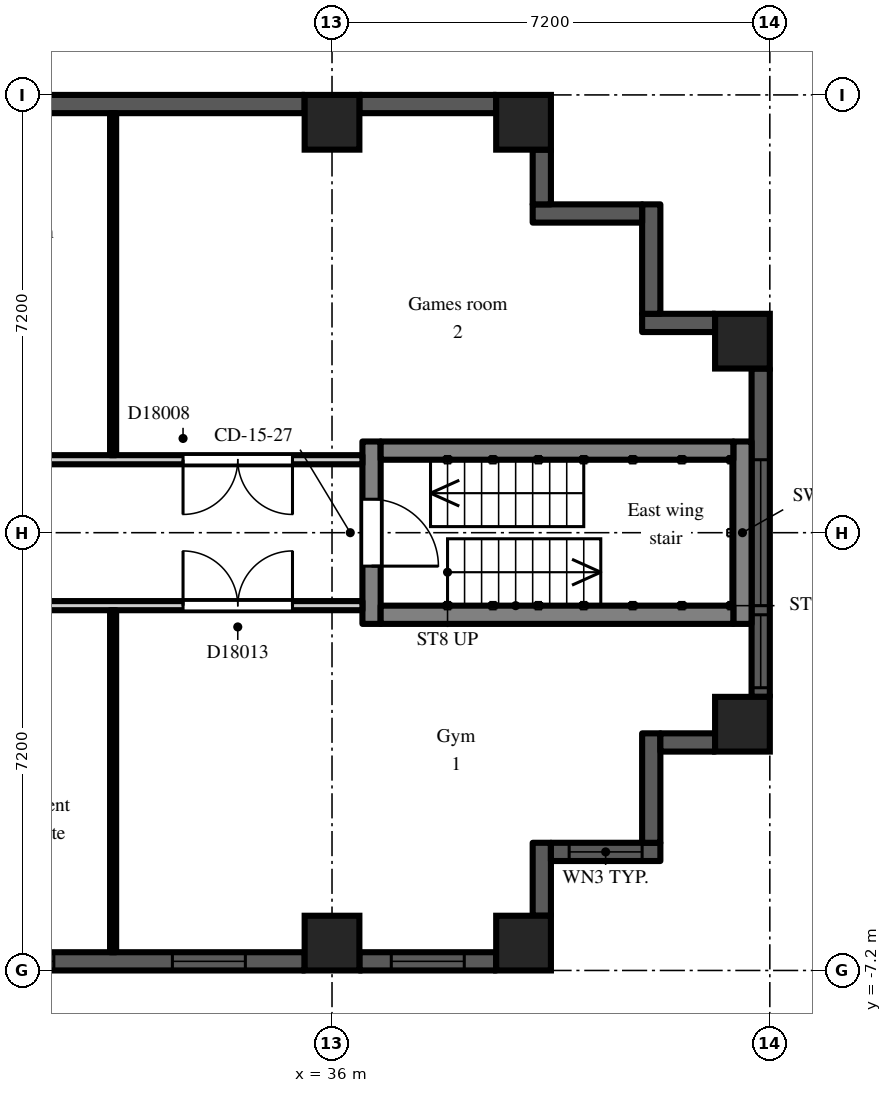
"""IFC4 building model, lengths in metres.
Left out: names, types, materials, properties, quantities, classifications, styles, units other than length and angle.
Written with IfcOpenShell. Run it as: python <this file> out.ifc"""

import sys

from ifc_helpers import new_model, si_unit, direction, frame, frame_2d, origin, origin_2d, place, context, subcontext, project, spatial, rectangle, extrude, element, fill, save


model = new_model("IFC4")
c1 = context("Model", 3, precision=1e-05, world=origin(), true_north=direction((0.0, 1.0)))
c2 = subcontext(c1, "Body", "Model", "MODEL_VIEW")
j1 = project(units=[si_unit("LENGTHUNIT", "METRE"), si_unit("PLANEANGLEUNIT", "RADIAN")], contexts=[c1])
p1 = place(None, origin())
s1 = spatial("IfcSite", under=j1, at=p1, CompositionType="ELEMENT")
p2 = place(p1, origin())
s2 = spatial("IfcBuilding", under=s1, at=p2, CompositionType="ELEMENT")
p3 = place(p2, frame((0.0, 0.0, 120.3)))
s3 = spatial("IfcBuildingStorey", under=s2, at=p3, CompositionType="ELEMENT", Elevation=120.3)
for number, where, z_axis, x_axis in (
    (1, (36.0, -6.75, 0.0), (0.0, 0.0, 1.0), (1.0, 0.0, 0.0)),
    (2, (36.0, 6.75, 0.0), (0.0, 0.0, 1.0), (1.0, 0.0, 0.0)),
    (3, (39.15, -6.75, 0.0), (0.0, 0.0, 1.0), (1.0, 0.0, 0.0)),
    (4, (39.15, 6.75, 0.0), (0.0, 0.0, 1.0), (1.0, 0.0, 0.0)),
    (5, (42.75, -3.15, 0.0), (0.0, 0.0, 1.0), (1.0, 0.0, 0.0)),
    (6, (42.75, 3.15, 0.0), (0.0, 0.0, 1.0), (1.0, 0.0, 0.0)),
):
    element("IfcColumn", number, at=place(p3, frame(where, z_axis=z_axis, x_axis=x_axis)), inside=s3, PredefinedType="COLUMN", context=c2, shape_type="SweptSolid", body=[
        extrude(rectangle(XDim=0.9, YDim=0.9, at=origin_2d()), origin(), (0.0, 0.0, 1.0), 3.0),
    ])
p4 = place(p3, frame((29.25, -7.05, 0.0), z_axis=(0.0, 0.0, 1.0), x_axis=(1.0, 0.0, 0.0)))
e7 = element("IfcWall", 7, at=p4, inside=s3, PredefinedType="SOLIDWALL", context=c2, shape_type="SweptSolid", body=[
    extrude(rectangle(XDim=6.3, YDim=0.3, at=frame_2d((3.15, 0.0))), origin(), (0.0, 0.0, 1.0), 2.2),
])
p5 = place(p4, frame((0.975, 0.0, 0.2)))
e8 = element("IfcOpeningElement", 8, at=p5, cuts=e7, PredefinedType="OPENING", context=c2, shape_type="SweptSolid", body=[
    extrude(rectangle(XDim=1.2, YDim=1.85, at=frame_2d((0.6, 0.925))), frame((0.0, 0.16, 0.0), z_axis=(0.0, -1.0, 0.0), x_axis=(1.0, 0.0, 0.0)), (0.0, 0.0, 1.0), 0.32),
])
p6 = place(p4, frame((4.125, 0.0, 0.2)))
e9 = element("IfcOpeningElement", 9, at=p6, cuts=e7, PredefinedType="OPENING", context=c2, shape_type="SweptSolid", body=[
    extrude(rectangle(XDim=1.2, YDim=1.85, at=frame_2d((0.6, 0.925))), frame((0.0, 0.16, 0.0), z_axis=(0.0, -1.0, 0.0), x_axis=(1.0, 0.0, 0.0)), (0.0, 0.0, 1.0), 0.32),
])
p7 = place(p3, frame((36.45, -7.05, 0.0), z_axis=(0.0, 0.0, 1.0), x_axis=(1.0, 0.0, 0.0)))
e10 = element("IfcWall", 10, at=p7, inside=s3, PredefinedType="SOLIDWALL", context=c2, shape_type="SweptSolid", body=[
    extrude(rectangle(XDim=2.25, YDim=0.3, at=frame_2d((1.125, 0.0))), origin(), (0.0, 0.0, 1.0), 2.2),
])
p8 = place(p7, frame((0.525, 0.0, 0.2)))
e11 = element("IfcOpeningElement", 11, at=p8, cuts=e10, PredefinedType="OPENING", context=c2, shape_type="SweptSolid", body=[
    extrude(rectangle(XDim=1.2, YDim=1.85, at=frame_2d((0.6, 0.925))), frame((0.0, 0.16, 0.0), z_axis=(0.0, -1.0, 0.0), x_axis=(1.0, 0.0, 0.0)), (0.0, 0.0, 1.0), 0.32),
])
p9 = place(p3, frame((39.45, -6.3, 0.0), z_axis=(0.0, 0.0, 1.0), x_axis=(0.0, 1.0, 0.0)))
e12 = element("IfcWall", 12, at=p9, inside=s3, PredefinedType="SOLIDWALL", context=c2, shape_type="SweptSolid", body=[
    extrude(rectangle(XDim=1.2, YDim=0.3, at=frame_2d((0.6, 0.0))), origin(), (0.0, 0.0, 1.0), 2.6),
])
p10 = place(p3, frame((39.6, -5.25, 0.0), z_axis=(0.0, 0.0, 1.0), x_axis=(1.0, 0.0, 0.0)))
e13 = element("IfcWall", 13, at=p10, inside=s3, PredefinedType="SOLIDWALL", context=c2, shape_type="SweptSolid", body=[
    extrude(rectangle(XDim=1.8, YDim=0.3, at=frame_2d((0.9, 0.0))), origin(), (0.0, 0.0, 1.0), 2.6),
])
p11 = place(p10, frame((0.3, 0.0, 0.2)))
e14 = element("IfcOpeningElement", 14, at=p11, cuts=e13, PredefinedType="OPENING", context=c2, shape_type="SweptSolid", body=[
    extrude(rectangle(XDim=1.2, YDim=1.85, at=frame_2d((0.6, 0.925))), frame((0.0, 0.16, 0.0), z_axis=(0.0, -1.0, 0.0), x_axis=(1.0, 0.0, 0.0)), (0.0, 0.0, 1.0), 0.32),
])
p12 = place(p3, frame((41.25, -5.1, 0.0), z_axis=(0.0, 0.0, 1.0), x_axis=(0.0, 1.0, 0.0)))
e15 = element("IfcWall", 15, at=p12, inside=s3, PredefinedType="SOLIDWALL", context=c2, shape_type="SweptSolid", body=[
    extrude(rectangle(XDim=1.8, YDim=0.3, at=frame_2d((0.9, 0.0))), origin(), (0.0, 0.0, 1.0), 2.6),
])
p13 = place(p3, frame((41.4, -3.45, 0.0), z_axis=(0.0, 0.0, 1.0), x_axis=(1.0, 0.0, 0.0)))
e16 = element("IfcWall", 16, at=p13, inside=s3, PredefinedType="SOLIDWALL", context=c2, shape_type="SweptSolid", body=[
    extrude(rectangle(XDim=0.9, YDim=0.3, at=frame_2d((0.45, 0.0))), origin(), (0.0, 0.0, 1.0), 2.6),
])
p14 = place(p3, frame((43.05, -2.7, 0.0), z_axis=(0.0, 0.0, 1.0), x_axis=(0.0, 1.0, 0.0)))
e17 = element("IfcWall", 17, at=p14, inside=s3, PredefinedType="SOLIDWALL", context=c2, shape_type="SweptSolid", body=[
    extrude(rectangle(XDim=5.4, YDim=0.3, at=frame_2d((2.7, 0.0))), origin(), (0.0, 0.0, 1.0), 2.2),
])
p15 = place(p14, frame((1.5, 0.0, 0.2)))
e18 = element("IfcOpeningElement", 18, at=p15, cuts=e17, PredefinedType="OPENING", context=c2, shape_type="SweptSolid", body=[
    extrude(rectangle(XDim=2.4, YDim=1.85, at=frame_2d((1.2, 0.925))), frame((0.0, 0.16, 0.0), z_axis=(0.0, -1.0, 0.0), x_axis=(1.0, 0.0, 0.0)), (0.0, 0.0, 1.0), 0.32),
])
p16 = place(p14, frame((0.15, 0.0, 0.2)))
e19 = element("IfcOpeningElement", 19, at=p16, cuts=e17, PredefinedType="OPENING", context=c2, shape_type="SweptSolid", body=[
    extrude(rectangle(XDim=1.2, YDim=1.85, at=frame_2d((0.6, 0.925))), frame((0.0, 0.16, 0.0), z_axis=(0.0, -1.0, 0.0), x_axis=(1.0, 0.0, 0.0)), (0.0, 0.0, 1.0), 0.32),
])
p17 = place(p3, frame((42.3, 3.45, 0.0), z_axis=(0.0, 0.0, 1.0), x_axis=(-1.0, 0.0, 0.0)))
e20 = element("IfcWall", 20, at=p17, inside=s3, PredefinedType="SOLIDWALL", context=c2, shape_type="SweptSolid", body=[
    extrude(rectangle(XDim=1.2, YDim=0.3, at=frame_2d((0.6, 0.0))), origin(), (0.0, 0.0, 1.0), 2.6),
])
p18 = place(p3, frame((41.25, 3.6, 0.0), z_axis=(0.0, 0.0, 1.0), x_axis=(0.0, 1.0, 0.0)))
e21 = element("IfcWall", 21, at=p18, inside=s3, PredefinedType="SOLIDWALL", context=c2, shape_type="SweptSolid", body=[
    extrude(rectangle(XDim=1.8, YDim=0.3, at=frame_2d((0.9, 0.0))), origin(), (0.0, 0.0, 1.0), 2.6),
])
p19 = place(p3, frame((41.1, 5.25, 0.0), z_axis=(0.0, 0.0, 1.0), x_axis=(-1.0, 0.0, 0.0)))
e22 = element("IfcWall", 22, at=p19, inside=s3, PredefinedType="SOLIDWALL", context=c2, shape_type="SweptSolid", body=[
    extrude(rectangle(XDim=1.8, YDim=0.3, at=frame_2d((0.9, 0.0))), origin(), (0.0, 0.0, 1.0), 2.6),
])
p20 = place(p3, frame((39.45, 5.4, 0.0), z_axis=(0.0, 0.0, 1.0), x_axis=(0.0, 1.0, 0.0)))
e23 = element("IfcWall", 23, at=p20, inside=s3, PredefinedType="SOLIDWALL", context=c2, shape_type="SweptSolid", body=[
    extrude(rectangle(XDim=0.9, YDim=0.3, at=frame_2d((0.45, 0.0))), origin(), (0.0, 0.0, 1.0), 2.6),
])
p21 = place(p3, frame((38.7, 7.05, 0.0), z_axis=(0.0, 0.0, 1.0), x_axis=(-1.0, 0.0, 0.0)))
e24 = element("IfcWall", 24, at=p21, inside=s3, PredefinedType="SOLIDWALL", context=c2, shape_type="SweptSolid", body=[
    extrude(rectangle(XDim=2.25, YDim=0.3, at=frame_2d((1.125, 0.0))), origin(), (0.0, 0.0, 1.0), 2.2),
])
p22 = place(p3, frame((35.55, 7.05, 0.0), z_axis=(0.0, 0.0, 1.0), x_axis=(-1.0, 0.0, 0.0)))
e25 = element("IfcWall", 25, at=p22, inside=s3, PredefinedType="SOLIDWALL", context=c2, shape_type="SweptSolid", body=[
    extrude(rectangle(XDim=6.3, YDim=0.3, at=frame_2d((3.15, 0.0))), origin(), (0.0, 0.0, 1.0), 2.2),
])
p23 = place(p3, frame((36.65, -1.5, 0.0), z_axis=(0.0, 0.0, 1.0), x_axis=(0.0, 1.0, 0.0)))
e26 = element("IfcWall", 26, at=p23, inside=s3, PredefinedType="SHEAR", context=c2, shape_type="SweptSolid", body=[
    extrude(rectangle(XDim=3.0, YDim=0.3, at=frame_2d((1.5, 0.0))), origin(), (0.0, 0.0, 1.0), 2.6),
])
p24 = place(p23, frame((0.95, 0.0, 0.0)))
e27 = element("IfcOpeningElement", 27, at=p24, cuts=e26, PredefinedType="OPENING", context=c2, shape_type="SweptSolid", body=[
    extrude(rectangle(XDim=1.1, YDim=2.1, at=frame_2d((0.55, 1.05))), frame((0.0, 0.16, 0.0), z_axis=(0.0, -1.0, 0.0), x_axis=(1.0, 0.0, 0.0)), (0.0, 0.0, 1.0), 0.32),
])
p25 = place(p3, frame((42.75, -1.5, 0.0), z_axis=(0.0, 0.0, 1.0), x_axis=(0.0, 1.0, 0.0)))
e28 = element("IfcWall", 28, at=p25, inside=s3, PredefinedType="SHEAR", context=c2, shape_type="SweptSolid", body=[
    extrude(rectangle(XDim=3.0, YDim=0.3, at=frame_2d((1.5, 0.0))), origin(), (0.0, 0.0, 1.0), 2.6),
])
for number, where, z_axis, x_axis in (
    (29, (36.8, -1.35, 0.0), (0.0, 0.0, 1.0), (1.0, 0.0, 0.0)),
    (30, (36.8, 1.35, 0.0), (0.0, 0.0, 1.0), (1.0, 0.0, 0.0)),
):
    element("IfcWall", number, at=place(p3, frame(where, z_axis=z_axis, x_axis=x_axis)), inside=s3, PredefinedType="SHEAR", context=c2, shape_type="SweptSolid", body=[
        extrude(rectangle(XDim=5.8, YDim=0.3, at=frame_2d((2.9, 0.0))), origin(), (0.0, 0.0, 1.0), 2.6),
    ])
p26 = place(p3, frame((21.6, -1.2, 0.0), z_axis=(0.0, 0.0, 1.0), x_axis=(1.0, 0.0, 0.0)))
e31 = element("IfcWall", 31, at=p26, inside=s3, PredefinedType="PARTITIONING", context=c2, shape_type="SweptSolid", body=[
    extrude(rectangle(XDim=14.9, YDim=0.15, at=frame_2d((7.45, 0.0))), origin(), (0.0, 0.0, 1.0), 2.6),
])
p27 = place(p26, frame((0.45, 0.0, 0.0)))
e32 = element("IfcOpeningElement", 32, at=p27, cuts=e31, PredefinedType="OPENING", context=c2, shape_type="SweptSolid", body=[
    extrude(rectangle(XDim=0.9, YDim=2.1, at=frame_2d((0.45, 1.05))), frame((0.0, 0.085, 0.0), z_axis=(0.0, -1.0, 0.0), x_axis=(1.0, 0.0, 0.0)), (0.0, 0.0, 1.0), 0.17),
])
p28 = place(p26, frame((2.25, 0.0, 0.0)))
e33 = element("IfcOpeningElement", 33, at=p28, cuts=e31, PredefinedType="OPENING", context=c2, shape_type="SweptSolid", body=[
    extrude(rectangle(XDim=0.9, YDim=2.1, at=frame_2d((0.45, 1.05))), frame((0.0, 0.085, 0.0), z_axis=(0.0, -1.0, 0.0), x_axis=(1.0, 0.0, 0.0)), (0.0, 0.0, 1.0), 0.17),
])
p29 = place(p26, frame((5.71, 0.0, 0.0)))
e34 = element("IfcOpeningElement", 34, at=p29, cuts=e31, PredefinedType="OPENING", context=c2, shape_type="SweptSolid", body=[
    extrude(rectangle(XDim=1.0, YDim=2.1, at=frame_2d((0.5, 1.05))), frame((0.0, 0.085, 0.0), z_axis=(0.0, -1.0, 0.0), x_axis=(1.0, 0.0, 0.0)), (0.0, 0.0, 1.0), 0.17),
])
p30 = place(p26, frame((11.95, 0.0, 0.0)))
e35 = element("IfcOpeningElement", 35, at=p30, cuts=e31, PredefinedType="OPENING", context=c2, shape_type="SweptSolid", body=[
    extrude(rectangle(XDim=1.8, YDim=2.1, at=frame_2d((0.9, 1.05))), frame((0.0, 0.085, 0.0), z_axis=(0.0, -1.0, 0.0), x_axis=(1.0, 0.0, 0.0)), (0.0, 0.0, 1.0), 0.17),
])
p31 = place(p3, frame((21.6, 1.2, 0.0), z_axis=(0.0, 0.0, 1.0), x_axis=(1.0, 0.0, 0.0)))
e36 = element("IfcWall", 36, at=p31, inside=s3, PredefinedType="PARTITIONING", context=c2, shape_type="SweptSolid", body=[
    extrude(rectangle(XDim=14.9, YDim=0.15, at=frame_2d((7.45, 0.0))), origin(), (0.0, 0.0, 1.0), 2.6),
])
p32 = place(p31, frame((0.45, 0.0, 0.0)))
e37 = element("IfcOpeningElement", 37, at=p32, cuts=e36, PredefinedType="OPENING", context=c2, shape_type="SweptSolid", body=[
    extrude(rectangle(XDim=0.9, YDim=2.1, at=frame_2d((0.45, 1.05))), frame((0.0, 0.085, 0.0), z_axis=(0.0, -1.0, 0.0), x_axis=(1.0, 0.0, 0.0)), (0.0, 0.0, 1.0), 0.17),
])
p33 = place(p31, frame((2.25, 0.0, 0.0)))
e38 = element("IfcOpeningElement", 38, at=p33, cuts=e36, PredefinedType="OPENING", context=c2, shape_type="SweptSolid", body=[
    extrude(rectangle(XDim=0.9, YDim=2.1, at=frame_2d((0.45, 1.05))), frame((0.0, 0.085, 0.0), z_axis=(0.0, -1.0, 0.0), x_axis=(1.0, 0.0, 0.0)), (0.0, 0.0, 1.0), 0.17),
])
p34 = place(p31, frame((6.3, 0.0, 0.0)))
e39 = element("IfcOpeningElement", 39, at=p34, cuts=e36, PredefinedType="OPENING", context=c2, shape_type="SweptSolid", body=[
    extrude(rectangle(XDim=1.8, YDim=2.1, at=frame_2d((0.9, 1.05))), frame((0.0, 0.085, 0.0), z_axis=(0.0, -1.0, 0.0), x_axis=(1.0, 0.0, 0.0)), (0.0, 0.0, 1.0), 0.17),
])
p35 = place(p31, frame((11.95, 0.0, 0.0)))
e40 = element("IfcOpeningElement", 40, at=p35, cuts=e36, PredefinedType="OPENING", context=c2, shape_type="SweptSolid", body=[
    extrude(rectangle(XDim=1.8, YDim=2.1, at=frame_2d((0.9, 1.05))), frame((0.0, 0.085, 0.0), z_axis=(0.0, -1.0, 0.0), x_axis=(1.0, 0.0, 0.0)), (0.0, 0.0, 1.0), 0.17),
])
for number, where, z_axis, x_axis in (
    (41, (32.4, -6.9, 0.0), (0.0, 0.0, 1.0), (0.0, 1.0, 0.0)),
    (42, (32.4, 1.275, 0.0), (0.0, 0.0, 1.0), (0.0, 1.0, 0.0)),
):
    element("IfcWall", number, at=place(p3, frame(where, z_axis=z_axis, x_axis=x_axis)), inside=s3, PredefinedType="PARTITIONING", context=c2, shape_type="SweptSolid", body=[
        extrude(rectangle(XDim=5.625, YDim=0.1, at=frame_2d((2.812, 0.0))), origin(), (0.0, 0.0, 1.0), 2.6),
    ])
p36 = place(p5, origin())
e43 = element("IfcWindow", 43, at=p36, inside=s3, PartitioningType="SINGLE_PANEL", PredefinedType="WINDOW", context=c2, shape_type="SweptSolid", body=[
    extrude(rectangle(XDim=1.2, YDim=1.85, at=frame_2d((0.6, 0.925))), frame((0.0, 0.03, 0.0), z_axis=(0.0, -1.0, 0.0), x_axis=(1.0, 0.0, 0.0)), (0.0, 0.0, 1.0), 0.06),
])
fill(e8, e43)
p37 = place(p6, origin())
e44 = element("IfcWindow", 44, at=p37, inside=s3, PartitioningType="SINGLE_PANEL", PredefinedType="WINDOW", context=c2, shape_type="SweptSolid", body=[
    extrude(rectangle(XDim=1.2, YDim=1.85, at=frame_2d((0.6, 0.925))), frame((0.0, 0.03, 0.0), z_axis=(0.0, -1.0, 0.0), x_axis=(1.0, 0.0, 0.0)), (0.0, 0.0, 1.0), 0.06),
])
fill(e9, e44)
p38 = place(p8, origin())
e45 = element("IfcWindow", 45, at=p38, inside=s3, PartitioningType="SINGLE_PANEL", PredefinedType="WINDOW", context=c2, shape_type="SweptSolid", body=[
    extrude(rectangle(XDim=1.2, YDim=1.85, at=frame_2d((0.6, 0.925))), frame((0.0, 0.03, 0.0), z_axis=(0.0, -1.0, 0.0), x_axis=(1.0, 0.0, 0.0)), (0.0, 0.0, 1.0), 0.06),
])
fill(e11, e45)
p39 = place(p11, origin())
e46 = element("IfcWindow", 46, at=p39, inside=s3, PartitioningType="SINGLE_PANEL", PredefinedType="WINDOW", context=c2, shape_type="SweptSolid", body=[
    extrude(rectangle(XDim=1.2, YDim=1.85, at=frame_2d((0.6, 0.925))), frame((0.0, 0.03, 0.0), z_axis=(0.0, -1.0, 0.0), x_axis=(1.0, 0.0, 0.0)), (0.0, 0.0, 1.0), 0.06),
])
fill(e14, e46)
p40 = place(p15, origin())
e47 = element("IfcWindow", 47, at=p40, inside=s3, PartitioningType="SINGLE_PANEL", PredefinedType="WINDOW", context=c2, shape_type="SweptSolid", body=[
    extrude(rectangle(XDim=2.4, YDim=1.85, at=frame_2d((1.2, 0.925))), frame((0.0, 0.03, 0.0), z_axis=(0.0, -1.0, 0.0), x_axis=(1.0, 0.0, 0.0)), (0.0, 0.0, 1.0), 0.06),
])
fill(e18, e47)
p41 = place(p16, origin())
e48 = element("IfcWindow", 48, at=p41, inside=s3, PartitioningType="SINGLE_PANEL", PredefinedType="WINDOW", context=c2, shape_type="SweptSolid", body=[
    extrude(rectangle(XDim=1.2, YDim=1.85, at=frame_2d((0.6, 0.925))), frame((0.0, 0.03, 0.0), z_axis=(0.0, -1.0, 0.0), x_axis=(1.0, 0.0, 0.0)), (0.0, 0.0, 1.0), 0.06),
])
fill(e19, e48)
p42 = place(p24, frame((1.1, 0.0, 0.0), z_axis=(0.0, 0.0, 1.0), x_axis=(-1.0, 0.0, 0.0)))
e49 = element("IfcDoor", 49, at=p42, inside=s3, OperationType="SINGLE_SWING_RIGHT", PredefinedType="DOOR", context=c2, shape_type="SweptSolid", body=[
    extrude(rectangle(XDim=1.1, YDim=2.1, at=frame_2d((0.55, 1.05))), frame((0.0, 0.025, 0.0), z_axis=(0.0, -1.0, 0.0), x_axis=(1.0, 0.0, 0.0)), (0.0, 0.0, 1.0), 0.05),
])
fill(e27, e49)
p43 = place(p35, frame((1.8, 0.0, 0.0), z_axis=(0.0, 0.0, 1.0), x_axis=(-1.0, 0.0, 0.0)))
e50 = element("IfcDoor", 50, at=p43, inside=s3, OperationType="DOUBLE_DOOR_DOUBLE_SWING", PredefinedType="DOOR", context=c2, shape_type="SweptSolid", body=[
    extrude(rectangle(XDim=1.8, YDim=2.1, at=frame_2d((0.9, 1.05))), frame((0.0, 0.025, 0.0), z_axis=(0.0, -1.0, 0.0), x_axis=(1.0, 0.0, 0.0)), (0.0, 0.0, 1.0), 0.05),
])
fill(e40, e50)
p44 = place(p30, origin())
e51 = element("IfcDoor", 51, at=p44, inside=s3, OperationType="DOUBLE_DOOR_DOUBLE_SWING", PredefinedType="DOOR", context=c2, shape_type="SweptSolid", body=[
    extrude(rectangle(XDim=1.8, YDim=2.1, at=frame_2d((0.9, 1.05))), frame((0.0, 0.025, 0.0), z_axis=(0.0, -1.0, 0.0), x_axis=(1.0, 0.0, 0.0)), (0.0, 0.0, 1.0), 0.05),
])
fill(e35, e51)
save(model, sys.argv[1])
